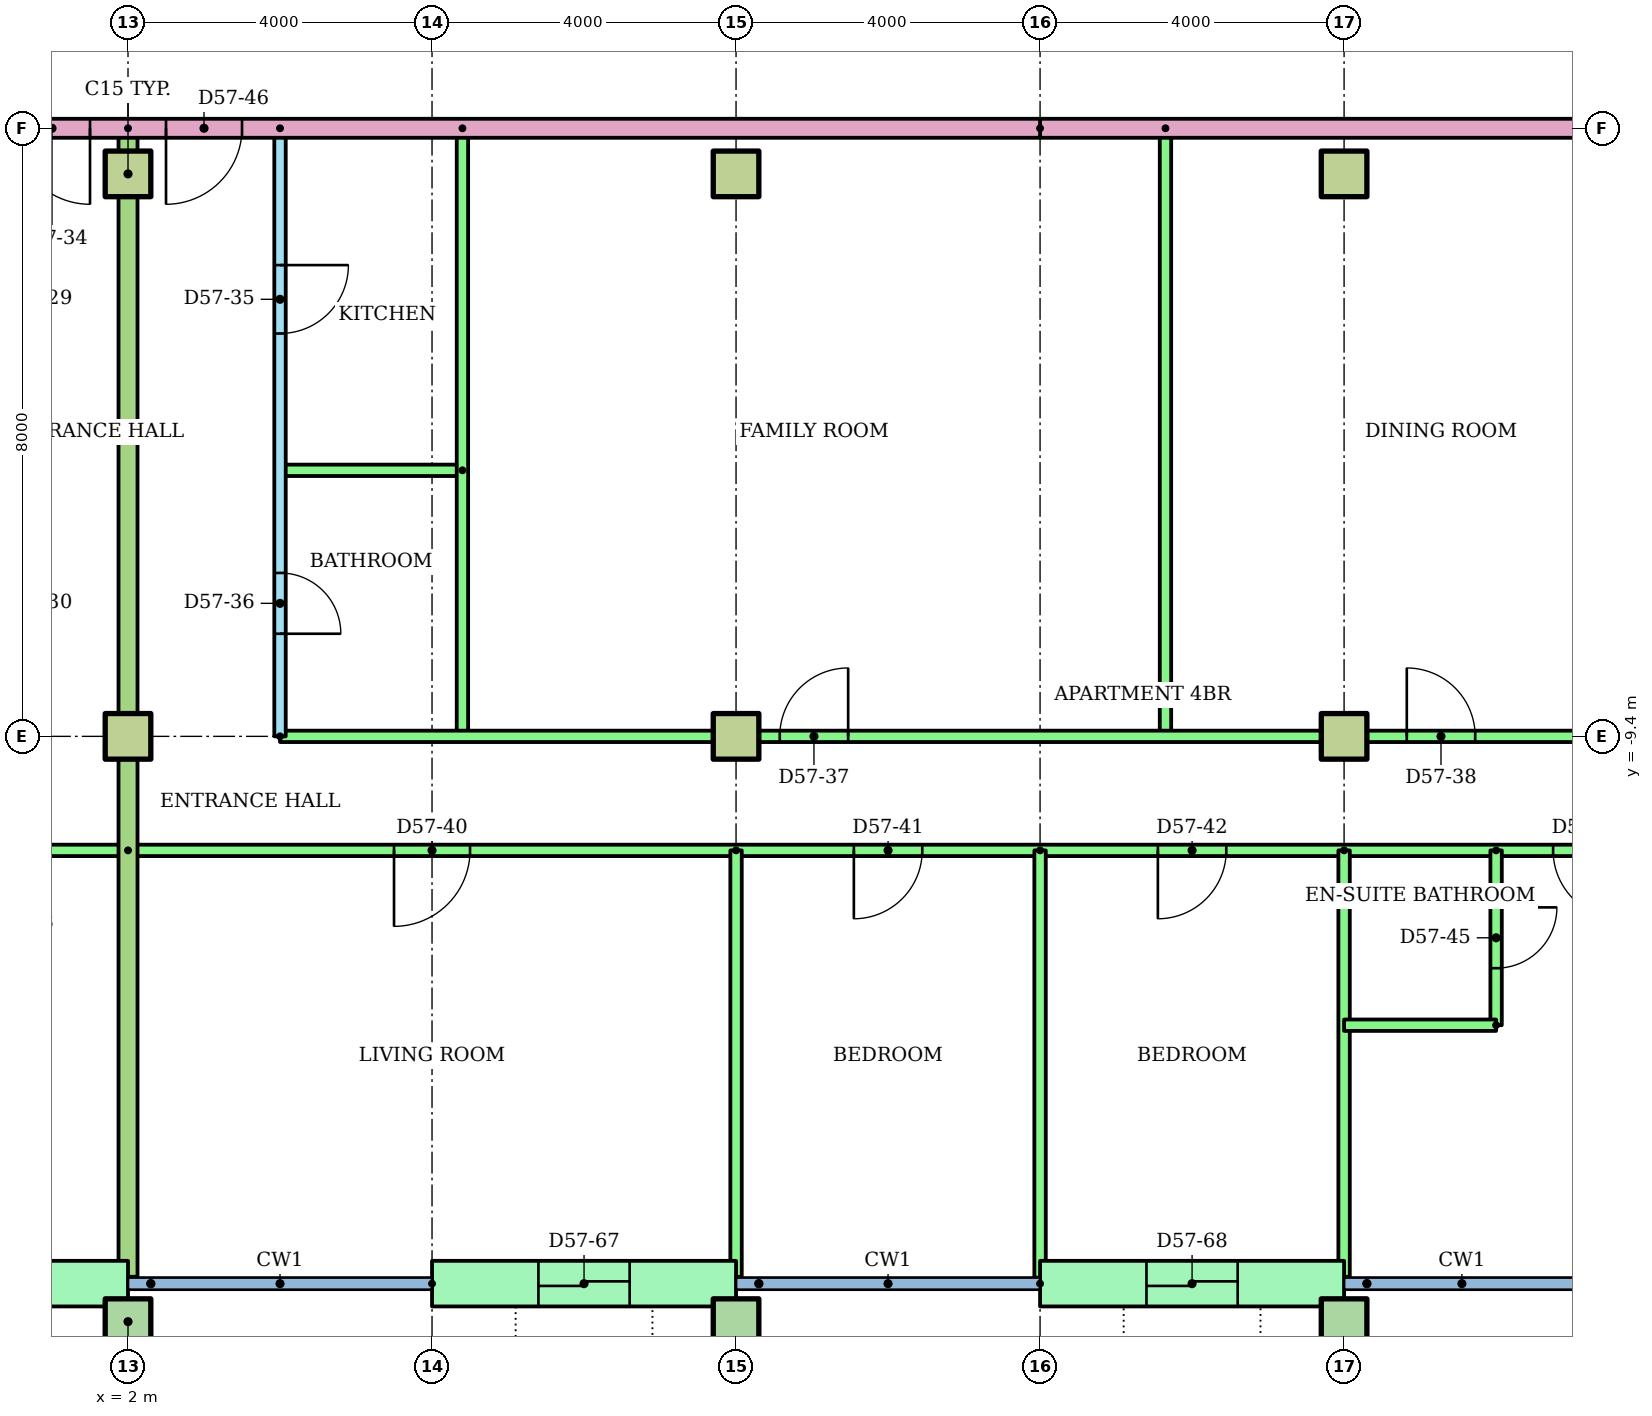
"""IFC4 building model, lengths in metres.
Left out: names, types, materials, properties, quantities, classifications, styles, units other than length and angle.
Written with IfcOpenShell. Run it as: python <this file> out.ifc"""

import sys

from ifc_helpers import new_model, si_unit, direction, frame, frame_2d, origin, origin_2d, place, context, subcontext, project, spatial, rectangle, hollow_rectangle, extrude, element, fill, save


model = new_model("IFC4")
c1 = context("Model", 3, precision=1e-05, world=origin(), true_north=direction((0.0, 1.0)))
c2 = subcontext(c1, "Body", "Model", "MODEL_VIEW")
j1 = project(units=[si_unit("LENGTHUNIT", "METRE"), si_unit("PLANEANGLEUNIT", "RADIAN")], contexts=[c1])
p1 = place(None, origin())
s1 = spatial("IfcSite", under=j1, at=p1, CompositionType="ELEMENT")
p2 = place(p1, origin())
s2 = spatial("IfcBuilding", under=s1, at=p2, CompositionType="ELEMENT")
p3 = place(p2, frame((0.0, 0.0, 220.4)))
s3 = spatial("IfcBuildingStorey", under=s2, at=p3, CompositionType="ELEMENT", Elevation=220.4)
for number, where in (
    (1, (2.0, -17.1, 0.0)),
    (2, (10.0, -17.1, 0.0)),
    (3, (18.0, -17.1, 0.0)),
):
    element("IfcColumn", number, at=place(p3, frame(where)), inside=s3, PredefinedType="COLUMN", context=c2, shape_type="SweptSolid", body=[
        extrude(hollow_rectangle(XDim=0.6, YDim=0.6, WallThickness=0.03, at=origin_2d()), origin(), (0.0, 0.0, 1.0), 3.2),
    ])
for number, where in (
    (4, (2.0, -9.4, 0.0)),
    (5, (10.0, -9.4, 0.0)),
    (6, (18.0, -9.4, 0.0)),
    (7, (2.0, -2.0, 0.0)),
    (8, (10.0, -2.0, 0.0)),
    (9, (18.0, -2.0, 0.0)),
):
    element("IfcColumn", number, at=place(p3, frame(where)), inside=s3, PredefinedType="COLUMN", context=c2, shape_type="SweptSolid", body=[
        extrude(rectangle(XDim=0.6, YDim=0.6, at=origin_2d()), origin(), (0.0, 0.0, 1.0), 3.2),
    ])
p4 = place(p3, frame((-2.0, -16.6, 0.0)))
e10 = element("IfcWall", 10, at=p4, inside=s3, PredefinedType="STANDARD", context=c2, shape_type="SweptSolid", body=[
    extrude(rectangle(XDim=4.0, YDim=0.6, at=frame_2d((2.0, 0.0))), origin(), (0.0, 0.0, 1.0), 2.92),
])
p5 = place(p4, frame((1.4, 0.0, 0.0)))
e11 = element("IfcOpeningElement", 11, at=p5, cuts=e10, PredefinedType="OPENING", context=c2, shape_type="SweptSolid", body=[
    extrude(rectangle(XDim=1.2, YDim=2.1, at=frame_2d((0.6, 1.05))), frame((0.0, 0.31, 0.0), z_axis=(0.0, -1.0, 0.0), x_axis=(1.0, 0.0, 0.0)), (0.0, 0.0, 1.0), 0.62),
])
p6 = place(p3, frame((6.0, -16.6, 0.0)))
e12 = element("IfcWall", 12, at=p6, inside=s3, PredefinedType="STANDARD", context=c2, shape_type="SweptSolid", body=[
    extrude(rectangle(XDim=4.0, YDim=0.6, at=frame_2d((2.0, 0.0))), origin(), (0.0, 0.0, 1.0), 2.92),
])
p7 = place(p6, frame((1.4, 0.0, 0.0)))
e13 = element("IfcOpeningElement", 13, at=p7, cuts=e12, PredefinedType="OPENING", context=c2, shape_type="SweptSolid", body=[
    extrude(rectangle(XDim=1.2, YDim=2.1, at=frame_2d((0.6, 1.05))), frame((0.0, 0.31, 0.0), z_axis=(0.0, -1.0, 0.0), x_axis=(1.0, 0.0, 0.0)), (0.0, 0.0, 1.0), 0.62),
])
p8 = place(p3, frame((14.0, -16.6, 0.0)))
e14 = element("IfcWall", 14, at=p8, inside=s3, PredefinedType="STANDARD", context=c2, shape_type="SweptSolid", body=[
    extrude(rectangle(XDim=4.0, YDim=0.6, at=frame_2d((2.0, 0.0))), origin(), (0.0, 0.0, 1.0), 2.92),
])
p9 = place(p8, frame((1.4, 0.0, 0.0)))
e15 = element("IfcOpeningElement", 15, at=p9, cuts=e14, PredefinedType="OPENING", context=c2, shape_type="SweptSolid", body=[
    extrude(rectangle(XDim=1.2, YDim=2.1, at=frame_2d((0.6, 1.05))), frame((0.0, 0.31, 0.0), z_axis=(0.0, -1.0, 0.0), x_axis=(1.0, 0.0, 0.0)), (0.0, 0.0, 1.0), 0.62),
])
p10 = place(p3, frame((2.0, -10.9, 0.0), z_axis=(0.0, 0.0, 1.0), x_axis=(-1.0, 0.0, 0.0)))
e16 = element("IfcWall", 16, at=p10, inside=s3, PredefinedType="PARTITIONING", context=c2, shape_type="SweptSolid", body=[
    extrude(rectangle(XDim=8.0, YDim=0.15, at=frame_2d((4.0, 0.0))), origin(), (0.0, 0.0, 1.0), 2.4),
])
p11 = place(p10, frame((5.55, 0.0, 0.0)))
e17 = element("IfcOpeningElement", 17, at=p11, cuts=e16, PredefinedType="OPENING", context=c2, shape_type="SweptSolid", body=[
    extrude(rectangle(XDim=0.9, YDim=2.1, at=frame_2d((0.45, 1.05))), frame((0.0, 0.085, 0.0), z_axis=(0.0, -1.0, 0.0), x_axis=(1.0, 0.0, 0.0)), (0.0, 0.0, 1.0), 0.17),
])
p12 = place(p10, frame((1.5, 0.0, 0.0)))
e18 = element("IfcOpeningElement", 18, at=p12, cuts=e16, PredefinedType="OPENING", context=c2, shape_type="SweptSolid", body=[
    extrude(rectangle(XDim=1.0, YDim=2.1, at=frame_2d((0.5, 1.05))), frame((0.0, 0.085, 0.0), z_axis=(0.0, -1.0, 0.0), x_axis=(1.0, 0.0, 0.0)), (0.0, 0.0, 1.0), 0.17),
])
p13 = place(p3, frame((4.0, -1.4, 0.0), z_axis=(0.0, 0.0, 1.0), x_axis=(0.0, -1.0, 0.0)))
e19 = element("IfcWall", 19, at=p13, inside=s3, PredefinedType="PARTITIONING", context=c2, shape_type="SweptSolid", body=[
    extrude(rectangle(XDim=8.0, YDim=0.15, at=frame_2d((4.0, 0.0))), origin(), (0.0, 0.0, 1.0), 2.4),
])
p14 = place(p13, frame((1.8, 0.0, 0.0)))
e20 = element("IfcOpeningElement", 20, at=p14, cuts=e19, PredefinedType="OPENING", context=c2, shape_type="SweptSolid", body=[
    extrude(rectangle(XDim=0.9, YDim=2.1, at=frame_2d((0.45, 1.05))), frame((0.0, 0.085, 0.0), z_axis=(0.0, -1.0, 0.0), x_axis=(1.0, 0.0, 0.0)), (0.0, 0.0, 1.0), 0.17),
])
p15 = place(p13, frame((5.85, 0.0, 0.0)))
e21 = element("IfcOpeningElement", 21, at=p15, cuts=e19, PredefinedType="OPENING", context=c2, shape_type="SweptSolid", body=[
    extrude(rectangle(XDim=0.8, YDim=2.1, at=frame_2d((0.4, 1.05))), frame((0.0, 0.085, 0.0), z_axis=(0.0, -1.0, 0.0), x_axis=(1.0, 0.0, 0.0)), (0.0, 0.0, 1.0), 0.17),
])
p16 = place(p3, frame((6.4, -5.9, 0.0), z_axis=(0.0, 0.0, 1.0), x_axis=(-1.0, 0.0, 0.0)))
e22 = element("IfcWall", 22, at=p16, inside=s3, PredefinedType="PARTITIONING", context=c2, shape_type="SweptSolid", body=[
    extrude(rectangle(XDim=2.4, YDim=0.15, at=frame_2d((1.2, 0.0))), origin(), (0.0, 0.0, 1.0), 2.4),
])
for number, where, z_axis, x_axis in (
    (23, (6.4, -1.4, 0.0), (0.0, 0.0, 1.0), (0.0, -1.0, 0.0)),
    (24, (15.65, -1.4, 0.0), (0.0, 0.0, 1.0), (0.0, -1.0, 0.0)),
):
    element("IfcWall", number, at=place(p3, frame(where, z_axis=z_axis, x_axis=x_axis)), inside=s3, PredefinedType="PARTITIONING", context=c2, shape_type="SweptSolid", body=[
        extrude(rectangle(XDim=8.0, YDim=0.15, at=frame_2d((4.0, 0.0))), origin(), (0.0, 0.0, 1.0), 2.4),
    ])
p17 = place(p3, frame((4.0, -9.4, 0.0)))
e25 = element("IfcWall", 25, at=p17, inside=s3, PredefinedType="PARTITIONING", context=c2, shape_type="SweptSolid", body=[
    extrude(rectangle(XDim=24.92, YDim=0.15, at=frame_2d((12.46, 0.0))), origin(), (0.0, 0.0, 1.0), 2.4),
])
p18 = place(p17, frame((6.575, 0.0, 0.0)))
e26 = element("IfcOpeningElement", 26, at=p18, cuts=e25, PredefinedType="OPENING", context=c2, shape_type="SweptSolid", body=[
    extrude(rectangle(XDim=0.9, YDim=2.1, at=frame_2d((0.45, 1.05))), frame((0.0, 0.085, 0.0), z_axis=(0.0, -1.0, 0.0), x_axis=(1.0, 0.0, 0.0)), (0.0, 0.0, 1.0), 0.17),
])
p19 = place(p17, frame((14.825, 0.0, 0.0)))
e27 = element("IfcOpeningElement", 27, at=p19, cuts=e25, PredefinedType="OPENING", context=c2, shape_type="SweptSolid", body=[
    extrude(rectangle(XDim=0.9, YDim=2.1, at=frame_2d((0.45, 1.05))), frame((0.0, 0.085, 0.0), z_axis=(0.0, -1.0, 0.0), x_axis=(1.0, 0.0, 0.0)), (0.0, 0.0, 1.0), 0.17),
])
p20 = place(p17, frame((20.624, 0.0, 0.0)))
e28 = element("IfcOpeningElement", 28, at=p20, cuts=e25, PredefinedType="OPENING", context=c2, shape_type="SweptSolid", body=[
    extrude(rectangle(XDim=0.9, YDim=2.1, at=frame_2d((0.45, 1.05))), frame((0.0, 0.085, 0.0), z_axis=(0.0, -1.0, 0.0), x_axis=(1.0, 0.0, 0.0)), (0.0, 0.0, 1.0), 0.17),
])
p21 = place(p3, frame((28.92, -10.9, 0.0), z_axis=(0.0, 0.0, 1.0), x_axis=(-1.0, 0.0, 0.0)))
e29 = element("IfcWall", 29, at=p21, inside=s3, PredefinedType="PARTITIONING", context=c2, shape_type="SweptSolid", body=[
    extrude(rectangle(XDim=26.92, YDim=0.15, at=frame_2d((13.46, 0.0))), origin(), (0.0, 0.0, 1.0), 2.4),
])
p22 = place(p21, frame((22.42, 0.0, 0.0)))
e30 = element("IfcOpeningElement", 30, at=p22, cuts=e29, PredefinedType="OPENING", context=c2, shape_type="SweptSolid", body=[
    extrude(rectangle(XDim=1.0, YDim=2.1, at=frame_2d((0.5, 1.05))), frame((0.0, 0.085, 0.0), z_axis=(0.0, -1.0, 0.0), x_axis=(1.0, 0.0, 0.0)), (0.0, 0.0, 1.0), 0.17),
])
p23 = place(p21, frame((16.47, 0.0, 0.0)))
e31 = element("IfcOpeningElement", 31, at=p23, cuts=e29, PredefinedType="OPENING", context=c2, shape_type="SweptSolid", body=[
    extrude(rectangle(XDim=0.9, YDim=2.1, at=frame_2d((0.45, 1.05))), frame((0.0, 0.085, 0.0), z_axis=(0.0, -1.0, 0.0), x_axis=(1.0, 0.0, 0.0)), (0.0, 0.0, 1.0), 0.17),
])
p24 = place(p21, frame((12.47, 0.0, 0.0)))
e32 = element("IfcOpeningElement", 32, at=p24, cuts=e29, PredefinedType="OPENING", context=c2, shape_type="SweptSolid", body=[
    extrude(rectangle(XDim=0.9, YDim=2.1, at=frame_2d((0.45, 1.05))), frame((0.0, 0.085, 0.0), z_axis=(0.0, -1.0, 0.0), x_axis=(1.0, 0.0, 0.0)), (0.0, 0.0, 1.0), 0.17),
])
p25 = place(p21, frame((7.27, 0.0, 0.0)))
e33 = element("IfcOpeningElement", 33, at=p25, cuts=e29, PredefinedType="OPENING", context=c2, shape_type="SweptSolid", body=[
    extrude(rectangle(XDim=0.9, YDim=2.1, at=frame_2d((0.45, 1.05))), frame((0.0, 0.085, 0.0), z_axis=(0.0, -1.0, 0.0), x_axis=(1.0, 0.0, 0.0)), (0.0, 0.0, 1.0), 0.17),
])
p26 = place(p21, frame((1.544, 0.0, 0.0)))
e34 = element("IfcOpeningElement", 34, at=p26, cuts=e29, PredefinedType="OPENING", context=c2, shape_type="SweptSolid", body=[
    extrude(rectangle(XDim=0.9, YDim=2.1, at=frame_2d((0.45, 1.05))), frame((0.0, 0.085, 0.0), z_axis=(0.0, -1.0, 0.0), x_axis=(1.0, 0.0, 0.0)), (0.0, 0.0, 1.0), 0.17),
])
p27 = place(p3, frame((10.0, -10.9, 0.0), z_axis=(0.0, 0.0, 1.0), x_axis=(0.0, -1.0, 0.0)))
e35 = element("IfcWall", 35, at=p27, inside=s3, PredefinedType="PARTITIONING", context=c2, shape_type="SweptSolid", body=[
    extrude(rectangle(XDim=5.61, YDim=0.15, at=frame_2d((2.805, 0.0))), origin(), (0.0, 0.0, 1.0), 2.4),
])
p28 = place(p3, frame((14.0, -10.9, 0.0), z_axis=(0.0, 0.0, 1.0), x_axis=(0.0, -1.0, 0.0)))
e36 = element("IfcWall", 36, at=p28, inside=s3, PredefinedType="PARTITIONING", context=c2, shape_type="SweptSolid", body=[
    extrude(rectangle(XDim=5.621, YDim=0.15, at=frame_2d((2.811, 0.0))), origin(), (0.0, 0.0, 1.0), 2.4),
])
p29 = place(p3, frame((18.0, -10.9, 0.0), z_axis=(0.0, 0.0, 1.0), x_axis=(0.0, -1.0, 0.0)))
e37 = element("IfcWall", 37, at=p29, inside=s3, PredefinedType="PARTITIONING", context=c2, shape_type="SweptSolid", body=[
    extrude(rectangle(XDim=5.61, YDim=0.15, at=frame_2d((2.805, 0.0))), origin(), (0.0, 0.0, 1.0), 2.4),
])
p30 = place(p3, frame((20.0, -10.9, 0.0), z_axis=(0.0, 0.0, 1.0), x_axis=(0.0, -1.0, 0.0)))
e38 = element("IfcWall", 38, at=p30, inside=s3, PredefinedType="PARTITIONING", context=c2, shape_type="SweptSolid", body=[
    extrude(rectangle(XDim=2.3, YDim=0.15, at=frame_2d((1.15, 0.0))), origin(), (0.0, 0.0, 1.0), 2.4),
])
p31 = place(p30, frame((0.75, 0.0, 0.0)))
e39 = element("IfcOpeningElement", 39, at=p31, cuts=e38, PredefinedType="OPENING", context=c2, shape_type="SweptSolid", body=[
    extrude(rectangle(XDim=0.8, YDim=2.1, at=frame_2d((0.4, 1.05))), frame((0.0, 0.085, 0.0), z_axis=(0.0, -1.0, 0.0), x_axis=(1.0, 0.0, 0.0)), (0.0, 0.0, 1.0), 0.17),
])
p32 = place(p3, frame((20.0, -13.2, 0.0), z_axis=(0.0, 0.0, 1.0), x_axis=(-1.0, 0.0, 0.0)))
e40 = element("IfcWall", 40, at=p32, inside=s3, PredefinedType="PARTITIONING", context=c2, shape_type="SweptSolid", body=[
    extrude(rectangle(XDim=2.0, YDim=0.15, at=frame_2d((1.0, 0.0))), origin(), (0.0, 0.0, 1.0), 2.4),
])
p33 = place(p3, frame((2.0, -1.4, 0.0), z_axis=(0.0, 0.0, 1.0), x_axis=(0.0, -1.0, 0.0)))
e41 = element("IfcWall", 41, at=p33, inside=s3, PredefinedType="PARTITIONING", context=c2, shape_type="SweptSolid", body=[
    extrude(rectangle(XDim=15.11, YDim=0.25, at=frame_2d((7.555, 0.0))), origin(), (0.0, 0.0, 1.0), 2.4),
])
p34 = place(p3, frame((28.92, -1.4, 0.0), z_axis=(0.0, 0.0, 1.0), x_axis=(-1.0, 0.0, 0.0)))
e42 = element("IfcWall", 42, at=p34, inside=s3, PredefinedType="PARTITIONING", context=c2, shape_type="SweptSolid", body=[
    extrude(rectangle(XDim=14.92, YDim=0.25, at=frame_2d((7.46, 0.0))), origin(), (0.0, 0.0, 1.0), 2.4),
])
p35 = place(p3, frame((14.0, -1.4, 0.0), z_axis=(0.0, 0.0, 1.0), x_axis=(-1.0, 0.0, 0.0)))
e43 = element("IfcWall", 43, at=p35, inside=s3, PredefinedType="PARTITIONING", context=c2, shape_type="SweptSolid", body=[
    extrude(rectangle(XDim=28.0, YDim=0.25, at=frame_2d((14.0, 0.0))), origin(), (0.0, 0.0, 1.0), 2.4),
])
p36 = place(p35, frame((20.5, 0.0, 0.0)))
e44 = element("IfcOpeningElement", 44, at=p36, cuts=e43, PredefinedType="OPENING", context=c2, shape_type="SweptSolid", body=[
    extrude(rectangle(XDim=1.0, YDim=2.1, at=frame_2d((0.5, 1.05))), frame((0.0, 0.135, 0.0), z_axis=(0.0, -1.0, 0.0), x_axis=(1.0, 0.0, 0.0)), (0.0, 0.0, 1.0), 0.27),
])
p37 = place(p35, frame((12.5, 0.0, 0.0)))
e45 = element("IfcOpeningElement", 45, at=p37, cuts=e43, PredefinedType="OPENING", context=c2, shape_type="SweptSolid", body=[
    extrude(rectangle(XDim=1.0, YDim=2.1, at=frame_2d((0.5, 1.05))), frame((0.0, 0.135, 0.0), z_axis=(0.0, -1.0, 0.0), x_axis=(1.0, 0.0, 0.0)), (0.0, 0.0, 1.0), 0.27),
])
p38 = place(p35, frame((10.5, 0.0, 0.0)))
e46 = element("IfcOpeningElement", 46, at=p38, cuts=e43, PredefinedType="OPENING", context=c2, shape_type="SweptSolid", body=[
    extrude(rectangle(XDim=1.0, YDim=2.1, at=frame_2d((0.5, 1.05))), frame((0.0, 0.135, 0.0), z_axis=(0.0, -1.0, 0.0), x_axis=(1.0, 0.0, 0.0)), (0.0, 0.0, 1.0), 0.27),
])
p39 = place(p37, origin())
e47 = element("IfcDoor", 47, at=p39, inside=s3, OperationType="SINGLE_SWING_LEFT", PredefinedType="DOOR", context=c2, shape_type="SweptSolid", body=[
    extrude(rectangle(XDim=1.0, YDim=2.1, at=frame_2d((0.5, 1.05))), frame((0.0, 0.025, 0.0), z_axis=(0.0, -1.0, 0.0), x_axis=(1.0, 0.0, 0.0)), (0.0, 0.0, 1.0), 0.05),
])
fill(e45, e47)
p40 = place(p14, origin())
e48 = element("IfcDoor", 48, at=p40, inside=s3, OperationType="SINGLE_SWING_LEFT", PredefinedType="DOOR", context=c2, shape_type="SweptSolid", body=[
    extrude(rectangle(XDim=0.9, YDim=2.1, at=frame_2d((0.45, 1.05))), frame((0.0, 0.025, 0.0), z_axis=(0.0, -1.0, 0.0), x_axis=(1.0, 0.0, 0.0)), (0.0, 0.0, 1.0), 0.05),
])
fill(e20, e48)
p41 = place(p15, origin())
e49 = element("IfcDoor", 49, at=p41, inside=s3, OperationType="SINGLE_SWING_RIGHT", PredefinedType="DOOR", context=c2, shape_type="SweptSolid", body=[
    extrude(rectangle(XDim=0.8, YDim=2.1, at=frame_2d((0.4, 1.05))), frame((0.0, 0.025, 0.0), z_axis=(0.0, -1.0, 0.0), x_axis=(1.0, 0.0, 0.0)), (0.0, 0.0, 1.0), 0.05),
])
fill(e21, e49)
p42 = place(p18, origin())
e50 = element("IfcDoor", 50, at=p42, inside=s3, OperationType="SINGLE_SWING_RIGHT", PredefinedType="DOOR", context=c2, shape_type="SweptSolid", body=[
    extrude(rectangle(XDim=0.9, YDim=2.1, at=frame_2d((0.45, 1.05))), frame((0.0, 0.025, 0.0), z_axis=(0.0, -1.0, 0.0), x_axis=(1.0, 0.0, 0.0)), (0.0, 0.0, 1.0), 0.05),
])
fill(e26, e50)
p43 = place(p19, origin())
e51 = element("IfcDoor", 51, at=p43, inside=s3, OperationType="SINGLE_SWING_LEFT", PredefinedType="DOOR", context=c2, shape_type="SweptSolid", body=[
    extrude(rectangle(XDim=0.9, YDim=2.1, at=frame_2d((0.45, 1.05))), frame((0.0, 0.025, 0.0), z_axis=(0.0, -1.0, 0.0), x_axis=(1.0, 0.0, 0.0)), (0.0, 0.0, 1.0), 0.05),
])
fill(e27, e51)
p44 = place(p22, origin())
e52 = element("IfcDoor", 52, at=p44, inside=s3, OperationType="SINGLE_SWING_RIGHT", PredefinedType="DOOR", context=c2, shape_type="SweptSolid", body=[
    extrude(rectangle(XDim=1.0, YDim=2.1, at=frame_2d((0.5, 1.05))), frame((0.0, 0.025, 0.0), z_axis=(0.0, -1.0, 0.0), x_axis=(1.0, 0.0, 0.0)), (0.0, 0.0, 1.0), 0.05),
])
fill(e30, e52)
p45 = place(p23, origin())
e53 = element("IfcDoor", 53, at=p45, inside=s3, OperationType="SINGLE_SWING_RIGHT", PredefinedType="DOOR", context=c2, shape_type="SweptSolid", body=[
    extrude(rectangle(XDim=0.9, YDim=2.1, at=frame_2d((0.45, 1.05))), frame((0.0, 0.025, 0.0), z_axis=(0.0, -1.0, 0.0), x_axis=(1.0, 0.0, 0.0)), (0.0, 0.0, 1.0), 0.05),
])
fill(e31, e53)
p46 = place(p24, origin())
e54 = element("IfcDoor", 54, at=p46, inside=s3, OperationType="SINGLE_SWING_RIGHT", PredefinedType="DOOR", context=c2, shape_type="SweptSolid", body=[
    extrude(rectangle(XDim=0.9, YDim=2.1, at=frame_2d((0.45, 1.05))), frame((0.0, 0.025, 0.0), z_axis=(0.0, -1.0, 0.0), x_axis=(1.0, 0.0, 0.0)), (0.0, 0.0, 1.0), 0.05),
])
fill(e32, e54)
p47 = place(p25, origin())
e55 = element("IfcDoor", 55, at=p47, inside=s3, OperationType="SINGLE_SWING_LEFT", PredefinedType="DOOR", context=c2, shape_type="SweptSolid", body=[
    extrude(rectangle(XDim=0.9, YDim=2.1, at=frame_2d((0.45, 1.05))), frame((0.0, 0.025, 0.0), z_axis=(0.0, -1.0, 0.0), x_axis=(1.0, 0.0, 0.0)), (0.0, 0.0, 1.0), 0.05),
])
fill(e33, e55)
p48 = place(p31, origin())
e56 = element("IfcDoor", 56, at=p48, inside=s3, OperationType="SINGLE_SWING_LEFT", PredefinedType="DOOR", context=c2, shape_type="SweptSolid", body=[
    extrude(rectangle(XDim=0.8, YDim=2.1, at=frame_2d((0.4, 1.05))), frame((0.0, 0.025, 0.0), z_axis=(0.0, -1.0, 0.0), x_axis=(1.0, 0.0, 0.0)), (0.0, 0.0, 1.0), 0.05),
])
fill(e39, e56)
p49 = place(p38, origin())
e57 = element("IfcDoor", 57, at=p49, inside=s3, OperationType="SINGLE_SWING_RIGHT", PredefinedType="DOOR", context=c2, shape_type="SweptSolid", body=[
    extrude(rectangle(XDim=1.0, YDim=2.1, at=frame_2d((0.5, 1.05))), frame((0.0, 0.025, 0.0), z_axis=(0.0, -1.0, 0.0), x_axis=(1.0, 0.0, 0.0)), (0.0, 0.0, 1.0), 0.05),
])
fill(e46, e57)
p50 = place(p7, origin())
e58 = element("IfcDoor", 58, at=p50, inside=s3, OperationType="SLIDING_TO_LEFT", PredefinedType="DOOR", context=c2, shape_type="SweptSolid", body=[
    extrude(rectangle(XDim=1.2, YDim=2.1, at=frame_2d((0.6, 1.05))), frame((0.0, 0.025, 0.0), z_axis=(0.0, -1.0, 0.0), x_axis=(1.0, 0.0, 0.0)), (0.0, 0.0, 1.0), 0.05),
])
fill(e13, e58)
p51 = place(p9, origin())
e59 = element("IfcDoor", 59, at=p51, inside=s3, OperationType="SLIDING_TO_LEFT", PredefinedType="DOOR", context=c2, shape_type="SweptSolid", body=[
    extrude(rectangle(XDim=1.2, YDim=2.1, at=frame_2d((0.6, 1.05))), frame((0.0, 0.025, 0.0), z_axis=(0.0, -1.0, 0.0), x_axis=(1.0, 0.0, 0.0)), (0.0, 0.0, 1.0), 0.05),
])
fill(e15, e59)
save(model, sys.argv[1])
